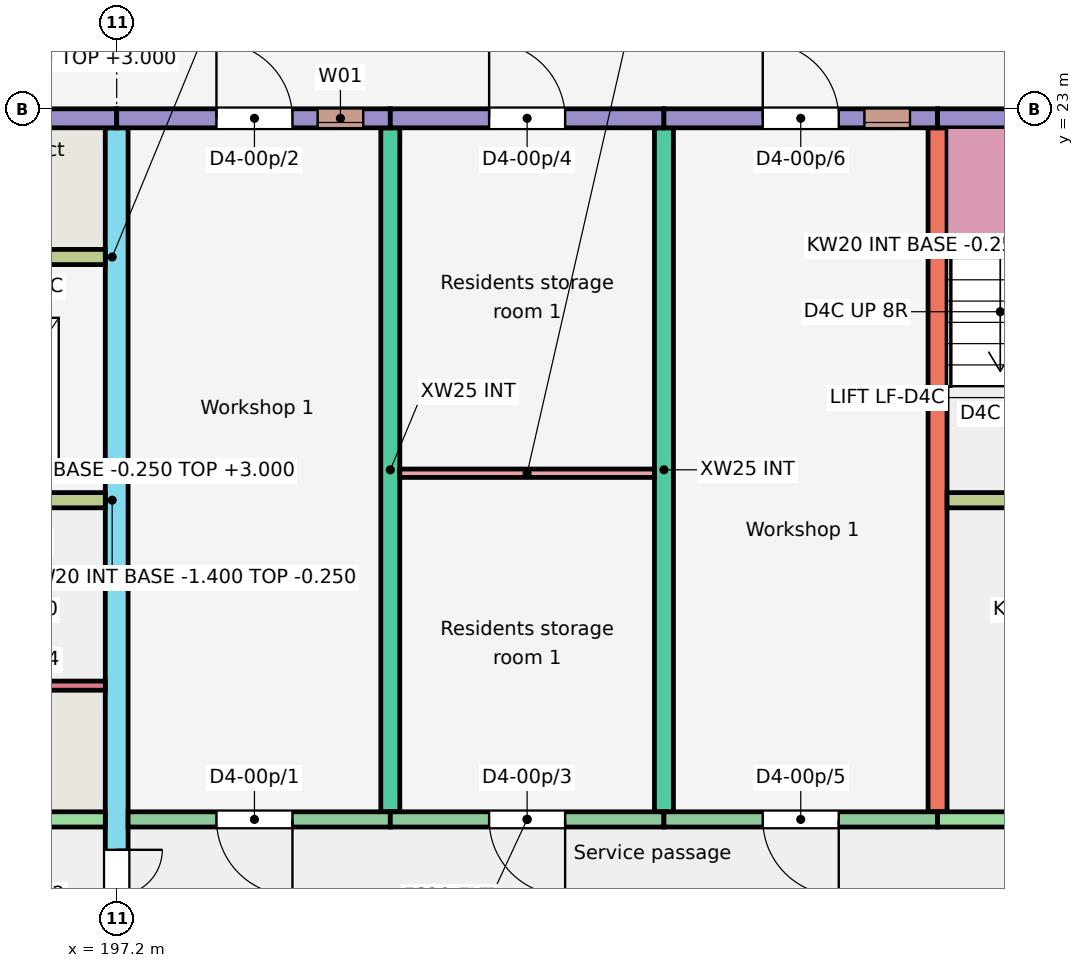
"""IFC4 building model, lengths in metres.
Left out: names, types, materials, properties, quantities, classifications, styles, units other than length and angle.
Written with IfcOpenShell. Run it as: python <this file> out.ifc"""

import sys

from ifc_helpers import new_model, si_unit, direction, frame, frame_2d, origin, place, context, subcontext, project, spatial, rectangle, extrude, element, fill, save


model = new_model("IFC4")
c1 = context("Model", 3, precision=1e-05, world=origin(), true_north=direction((0.0, 1.0)))
c2 = subcontext(c1, "Body", "Model", "MODEL_VIEW")
j1 = project(units=[si_unit("LENGTHUNIT", "METRE"), si_unit("PLANEANGLEUNIT", "RADIAN")], contexts=[c1])
p1 = place(None, origin())
s1 = spatial("IfcSite", under=j1, at=p1, CompositionType="ELEMENT")
p2 = place(p1, origin())
s2 = spatial("IfcBuilding", under=s1, at=p2, CompositionType="ELEMENT")
p3 = place(p2, origin())
s3 = spatial("IfcBuildingStorey", under=s2, at=p3, CompositionType="ELEMENT", Elevation=0.0)
p4 = place(p3, frame((197.2, 11.75, -0.25), z_axis=(0.0, 0.0, 1.0), x_axis=(0.0, 1.0, 0.0)))
e1 = element("IfcWall", 1, at=p4, inside=s3, PredefinedType="SHEAR", context=c2, shape_type="SweptSolid", body=[
    extrude(rectangle(XDim=11.0, YDim=0.3, at=frame_2d((5.5, 0.0))), origin(), (0.0, 0.0, 1.0), 3.25),
])
p5 = place(p4, frame((0.3, 0.0, 0.25)))
e2 = element("IfcOpeningElement", 2, at=p5, cuts=e1, PredefinedType="OPENING", context=c2, shape_type="SweptSolid", body=[
    extrude(rectangle(XDim=1.2, YDim=2.1, at=frame_2d((0.6, 1.05))), frame((0.0, 0.16, 0.0), z_axis=(0.0, -1.0, 0.0), x_axis=(1.0, 0.0, 0.0)), (0.0, 0.0, 1.0), 0.32),
])
for number, where, z_axis, x_axis in (
    (3, (200.8, 13.75, -0.25), (0.0, 0.0, 1.0), (0.0, 1.0, 0.0)),
    (4, (204.4, 13.75, -0.25), (0.0, 0.0, 1.0), (0.0, 1.0, 0.0)),
    (5, (208.0, 13.75, -0.25), (0.0, 0.0, 1.0), (0.0, 1.0, 0.0)),
):
    element("IfcWall", number, at=place(p3, frame(where, z_axis=z_axis, x_axis=x_axis)), inside=s3, PredefinedType="SHEAR", context=c2, shape_type="SweptSolid", body=[
        extrude(rectangle(XDim=9.0, YDim=0.25, at=frame_2d((4.5, 0.0))), origin(), (0.0, 0.0, 1.0), 3.25),
    ])
p6 = place(p3, frame((191.2, 22.875, -0.25), z_axis=(0.0, 0.0, 1.0), x_axis=(1.0, 0.0, 0.0)))
e6 = element("IfcWall", 6, at=p6, inside=s3, PredefinedType="SOLIDWALL", context=c2, shape_type="SweptSolid", body=[
    extrude(rectangle(XDim=6.0, YDim=0.25, at=frame_2d((3.0, 0.0))), origin(), (0.0, 0.0, 1.0), 3.25),
])
p7 = place(p6, frame((1.025, 0.0, 0.25)))
e7 = element("IfcOpeningElement", 7, at=p7, cuts=e6, PredefinedType="OPENING", context=c2, shape_type="SweptSolid", body=[
    extrude(rectangle(XDim=1.1, YDim=2.1, at=frame_2d((0.55, 1.05))), frame((0.0, 0.135, 0.0), z_axis=(0.0, -1.0, 0.0), x_axis=(1.0, 0.0, 0.0)), (0.0, 0.0, 1.0), 0.27),
])
p8 = place(p3, frame((191.2, 13.65, -0.25), z_axis=(0.0, 0.0, 1.0), x_axis=(1.0, 0.0, 0.0)))
e8 = element("IfcWall", 8, at=p8, inside=s3, PredefinedType="SHEAR", context=c2, shape_type="SweptSolid", body=[
    extrude(rectangle(XDim=5.85, YDim=0.2, at=frame_2d((2.925, 0.0))), origin(), (0.0, 0.0, 1.0), 3.25),
])
p9 = place(p8, frame((2.438, 0.0, 0.25)))
e9 = element("IfcOpeningElement", 9, at=p9, cuts=e8, PredefinedType="OPENING", context=c2, shape_type="SweptSolid", body=[
    extrude(rectangle(XDim=1.1, YDim=2.1, at=frame_2d((0.55, 1.05))), frame((0.0, 0.11, 0.0), z_axis=(0.0, -1.0, 0.0), x_axis=(1.0, 0.0, 0.0)), (0.0, 0.0, 1.0), 0.22),
])
p10 = place(p3, frame((191.325, 17.85, -0.25), z_axis=(0.0, 0.0, 1.0), x_axis=(1.0, 0.0, 0.0)))
e10 = element("IfcWall", 10, at=p10, inside=s3, PredefinedType="SHEAR", context=c2, shape_type="SweptSolid", body=[
    extrude(rectangle(XDim=5.725, YDim=0.2, at=frame_2d((2.863, 0.0))), origin(), (0.0, 0.0, 1.0), 3.25),
])
p11 = place(p10, frame((0.95, 0.0, 0.25)))
e11 = element("IfcOpeningElement", 11, at=p11, cuts=e10, PredefinedType="OPENING", context=c2, shape_type="SweptSolid", body=[
    extrude(rectangle(XDim=1.0, YDim=2.1, at=frame_2d((0.5, 1.05))), frame((0.0, 0.11, 0.0), z_axis=(0.0, -1.0, 0.0), x_axis=(1.0, 0.0, 0.0)), (0.0, 0.0, 1.0), 0.22),
])
p12 = place(p10, frame((3.863, 0.0, 0.25)))
e12 = element("IfcOpeningElement", 12, at=p12, cuts=e10, PredefinedType="OPENING", context=c2, shape_type="SweptSolid", body=[
    extrude(rectangle(XDim=1.1, YDim=2.1, at=frame_2d((0.55, 1.05))), frame((0.0, 0.11, 0.0), z_axis=(0.0, -1.0, 0.0), x_axis=(1.0, 0.0, 0.0)), (0.0, 0.0, 1.0), 0.22),
])
p13 = place(p3, frame((194.425, 21.05, -0.25), z_axis=(0.0, 0.0, 1.0), x_axis=(1.0, 0.0, 0.0)))
e13 = element("IfcWall", 13, at=p13, inside=s3, PredefinedType="SHEAR", context=c2, shape_type="SweptSolid", body=[
    extrude(rectangle(XDim=2.625, YDim=0.2, at=frame_2d((1.312, 0.0))), origin(), (0.0, 0.0, 1.0), 3.25),
])
p14 = place(p3, frame((195.92, 15.41, -0.25), z_axis=(0.0, 0.0, 1.0), x_axis=(1.0, 0.0, 0.0)))
e14 = element("IfcWall", 14, at=p14, inside=s3, PredefinedType="SHEAR", context=c2, shape_type="SweptSolid", body=[
    extrude(rectangle(XDim=1.13, YDim=0.12, at=frame_2d((0.565, 0.0))), origin(), (0.0, 0.0, 1.0), 3.25),
])
p15 = place(p3, frame((197.2, 22.875, -0.25), z_axis=(0.0, 0.0, 1.0), x_axis=(1.0, 0.0, 0.0)))
e15 = element("IfcWall", 15, at=p15, inside=s3, PredefinedType="SOLIDWALL", context=c2, shape_type="SweptSolid", body=[
    extrude(rectangle(XDim=3.6, YDim=0.25, at=frame_2d((1.8, 0.0))), origin(), (0.0, 0.0, 1.0), 3.25),
])
p16 = place(p15, frame((2.644, 0.0, 2.05)))
e16 = element("IfcOpeningElement", 16, at=p16, cuts=e15, PredefinedType="OPENING", context=c2, shape_type="SweptSolid", body=[
    extrude(rectangle(XDim=0.6, YDim=0.6, at=frame_2d((0.3, 0.3))), frame((0.0, 0.135, 0.0), z_axis=(0.0, -1.0, 0.0), x_axis=(1.0, 0.0, 0.0)), (0.0, 0.0, 1.0), 0.27),
])
p17 = place(p15, frame((1.312, 0.0, 0.25)))
e17 = element("IfcOpeningElement", 17, at=p17, cuts=e15, PredefinedType="OPENING", context=c2, shape_type="SweptSolid", body=[
    extrude(rectangle(XDim=1.0, YDim=2.1, at=frame_2d((0.5, 1.05))), frame((0.0, 0.135, 0.0), z_axis=(0.0, -1.0, 0.0), x_axis=(1.0, 0.0, 0.0)), (0.0, 0.0, 1.0), 0.27),
])
p18 = place(p3, frame((197.35, 13.65, -0.25), z_axis=(0.0, 0.0, 1.0), x_axis=(1.0, 0.0, 0.0)))
e18 = element("IfcWall", 18, at=p18, inside=s3, PredefinedType="SOLIDWALL", context=c2, shape_type="SweptSolid", body=[
    extrude(rectangle(XDim=3.45, YDim=0.2, at=frame_2d((1.725, 0.0))), origin(), (0.0, 0.0, 1.0), 3.25),
])
p19 = place(p18, frame((1.163, 0.0, 0.25)))
e19 = element("IfcOpeningElement", 19, at=p19, cuts=e18, PredefinedType="OPENING", context=c2, shape_type="SweptSolid", body=[
    extrude(rectangle(XDim=1.0, YDim=2.1, at=frame_2d((0.5, 1.05))), frame((0.0, 0.11, 0.0), z_axis=(0.0, -1.0, 0.0), x_axis=(1.0, 0.0, 0.0)), (0.0, 0.0, 1.0), 0.22),
])
p20 = place(p3, frame((200.8, 22.875, -0.25), z_axis=(0.0, 0.0, 1.0), x_axis=(1.0, 0.0, 0.0)))
e20 = element("IfcWall", 20, at=p20, inside=s3, PredefinedType="SOLIDWALL", context=c2, shape_type="SweptSolid", body=[
    extrude(rectangle(XDim=3.6, YDim=0.25, at=frame_2d((1.8, 0.0))), origin(), (0.0, 0.0, 1.0), 3.25),
])
p21 = place(p20, frame((1.3, 0.0, 0.25)))
e21 = element("IfcOpeningElement", 21, at=p21, cuts=e20, PredefinedType="OPENING", context=c2, shape_type="SweptSolid", body=[
    extrude(rectangle(XDim=1.0, YDim=2.1, at=frame_2d((0.5, 1.05))), frame((0.0, 0.135, 0.0), z_axis=(0.0, -1.0, 0.0), x_axis=(1.0, 0.0, 0.0)), (0.0, 0.0, 1.0), 0.27),
])
p22 = place(p3, frame((200.8, 13.65, -0.25), z_axis=(0.0, 0.0, 1.0), x_axis=(1.0, 0.0, 0.0)))
e22 = element("IfcWall", 22, at=p22, inside=s3, PredefinedType="SOLIDWALL", context=c2, shape_type="SweptSolid", body=[
    extrude(rectangle(XDim=3.6, YDim=0.2, at=frame_2d((1.8, 0.0))), origin(), (0.0, 0.0, 1.0), 3.25),
])
p23 = place(p22, frame((1.3, 0.0, 0.25)))
e23 = element("IfcOpeningElement", 23, at=p23, cuts=e22, PredefinedType="OPENING", context=c2, shape_type="SweptSolid", body=[
    extrude(rectangle(XDim=1.0, YDim=2.1, at=frame_2d((0.5, 1.05))), frame((0.0, 0.11, 0.0), z_axis=(0.0, -1.0, 0.0), x_axis=(1.0, 0.0, 0.0)), (0.0, 0.0, 1.0), 0.22),
])
p24 = place(p3, frame((204.4, 22.875, -0.25), z_axis=(0.0, 0.0, 1.0), x_axis=(1.0, 0.0, 0.0)))
e24 = element("IfcWall", 24, at=p24, inside=s3, PredefinedType="SOLIDWALL", context=c2, shape_type="SweptSolid", body=[
    extrude(rectangle(XDim=3.6, YDim=0.25, at=frame_2d((1.8, 0.0))), origin(), (0.0, 0.0, 1.0), 3.25),
])
p25 = place(p24, frame((2.637, 0.0, 2.05)))
e25 = element("IfcOpeningElement", 25, at=p25, cuts=e24, PredefinedType="OPENING", context=c2, shape_type="SweptSolid", body=[
    extrude(rectangle(XDim=0.6, YDim=0.6, at=frame_2d((0.3, 0.3))), frame((0.0, 0.135, 0.0), z_axis=(0.0, -1.0, 0.0), x_axis=(1.0, 0.0, 0.0)), (0.0, 0.0, 1.0), 0.27),
])
p26 = place(p24, frame((1.3, 0.0, 0.25)))
e26 = element("IfcOpeningElement", 26, at=p26, cuts=e24, PredefinedType="OPENING", context=c2, shape_type="SweptSolid", body=[
    extrude(rectangle(XDim=1.0, YDim=2.1, at=frame_2d((0.5, 1.05))), frame((0.0, 0.135, 0.0), z_axis=(0.0, -1.0, 0.0), x_axis=(1.0, 0.0, 0.0)), (0.0, 0.0, 1.0), 0.27),
])
p27 = place(p3, frame((204.4, 13.65, -0.25), z_axis=(0.0, 0.0, 1.0), x_axis=(1.0, 0.0, 0.0)))
e27 = element("IfcWall", 27, at=p27, inside=s3, PredefinedType="SOLIDWALL", context=c2, shape_type="SweptSolid", body=[
    extrude(rectangle(XDim=3.6, YDim=0.2, at=frame_2d((1.8, 0.0))), origin(), (0.0, 0.0, 1.0), 3.25),
])
p28 = place(p27, frame((1.3, 0.0, 0.25)))
e28 = element("IfcOpeningElement", 28, at=p28, cuts=e27, PredefinedType="OPENING", context=c2, shape_type="SweptSolid", body=[
    extrude(rectangle(XDim=1.0, YDim=2.1, at=frame_2d((0.5, 1.05))), frame((0.0, 0.11, 0.0), z_axis=(0.0, -1.0, 0.0), x_axis=(1.0, 0.0, 0.0)), (0.0, 0.0, 1.0), 0.22),
])
p29 = place(p3, frame((208.0, 22.875, -0.25), z_axis=(0.0, 0.0, 1.0), x_axis=(1.0, 0.0, 0.0)))
e29 = element("IfcWall", 29, at=p29, inside=s3, PredefinedType="SOLIDWALL", context=c2, shape_type="SweptSolid", body=[
    extrude(rectangle(XDim=6.0, YDim=0.25, at=frame_2d((3.0, 0.0))), origin(), (0.0, 0.0, 1.0), 3.25),
])
p30 = place(p29, frame((1.025, 0.0, 0.25)))
e30 = element("IfcOpeningElement", 30, at=p30, cuts=e29, PredefinedType="OPENING", context=c2, shape_type="SweptSolid", body=[
    extrude(rectangle(XDim=1.1, YDim=2.1, at=frame_2d((0.55, 1.05))), frame((0.0, 0.135, 0.0), z_axis=(0.0, -1.0, 0.0), x_axis=(1.0, 0.0, 0.0)), (0.0, 0.0, 1.0), 0.27),
])
p31 = place(p3, frame((208.0, 13.65, -0.25), z_axis=(0.0, 0.0, 1.0), x_axis=(1.0, 0.0, 0.0)))
e31 = element("IfcWall", 31, at=p31, inside=s3, PredefinedType="SHEAR", context=c2, shape_type="SweptSolid", body=[
    extrude(rectangle(XDim=5.85, YDim=0.2, at=frame_2d((2.925, 0.0))), origin(), (0.0, 0.0, 1.0), 3.25),
])
p32 = place(p31, frame((2.438, 0.0, 0.25)))
e32 = element("IfcOpeningElement", 32, at=p32, cuts=e31, PredefinedType="OPENING", context=c2, shape_type="SweptSolid", body=[
    extrude(rectangle(XDim=1.1, YDim=2.1, at=frame_2d((0.55, 1.05))), frame((0.0, 0.11, 0.0), z_axis=(0.0, -1.0, 0.0), x_axis=(1.0, 0.0, 0.0)), (0.0, 0.0, 1.0), 0.22),
])
p33 = place(p3, frame((208.125, 17.85, -0.25), z_axis=(0.0, 0.0, 1.0), x_axis=(1.0, 0.0, 0.0)))
e33 = element("IfcWall", 33, at=p33, inside=s3, PredefinedType="SHEAR", context=c2, shape_type="SweptSolid", body=[
    extrude(rectangle(XDim=5.725, YDim=0.2, at=frame_2d((2.863, 0.0))), origin(), (0.0, 0.0, 1.0), 3.25),
])
p34 = place(p33, frame((0.95, 0.0, 0.25)))
e34 = element("IfcOpeningElement", 34, at=p34, cuts=e33, PredefinedType="OPENING", context=c2, shape_type="SweptSolid", body=[
    extrude(rectangle(XDim=1.0, YDim=2.1, at=frame_2d((0.5, 1.05))), frame((0.0, 0.11, 0.0), z_axis=(0.0, -1.0, 0.0), x_axis=(1.0, 0.0, 0.0)), (0.0, 0.0, 1.0), 0.22),
])
p35 = place(p33, frame((3.863, 0.0, 0.25)))
e35 = element("IfcOpeningElement", 35, at=p35, cuts=e33, PredefinedType="OPENING", context=c2, shape_type="SweptSolid", body=[
    extrude(rectangle(XDim=1.1, YDim=2.1, at=frame_2d((0.55, 1.05))), frame((0.0, 0.11, 0.0), z_axis=(0.0, -1.0, 0.0), x_axis=(1.0, 0.0, 0.0)), (0.0, 0.0, 1.0), 0.22),
])
for number, where, z_axis, x_axis in (
    (36, (194.225, 17.85, -1.4), (0.0, 0.0, 1.0), (1.0, 0.0, 0.0)),
    (37, (194.225, 21.05, -1.4), (0.0, 0.0, 1.0), (1.0, 0.0, 0.0)),
):
    element("IfcWall", number, at=place(p3, frame(where, z_axis=z_axis, x_axis=x_axis)), inside=s3, PredefinedType="SHEAR", context=c2, shape_type="SweptSolid", body=[
        extrude(rectangle(XDim=2.975, YDim=0.2, at=frame_2d((1.487, 0.0))), origin(), (0.0, 0.0, 1.0), 1.15),
    ])
p36 = place(p3, frame((197.125, 17.95, -1.4), z_axis=(0.0, 0.0, 1.0), x_axis=(0.0, 1.0, 0.0)))
e38 = element("IfcWall", 38, at=p36, inside=s3, PredefinedType="SHEAR", context=c2, shape_type="SweptSolid", body=[
    extrude(rectangle(XDim=3.0, YDim=0.15, at=frame_2d((1.5, 0.0))), origin(), (0.0, 0.0, 1.0), 1.15),
])
p37 = place(p3, frame((200.925, 18.205, 0.0), z_axis=(0.0, 0.0, 1.0), x_axis=(1.0, 0.0, 0.0)))
e39 = element("IfcWall", 39, at=p37, inside=s3, PredefinedType="PARTITIONING", context=c2, shape_type="SweptSolid", body=[
    extrude(rectangle(XDim=3.35, YDim=0.11, at=frame_2d((1.675, 0.0))), origin(), (0.0, 0.0, 1.0), 2.8),
])
p38 = place(p16, origin())
e40 = element("IfcWindow", 40, at=p38, inside=s3, PartitioningType="SINGLE_PANEL", PredefinedType="WINDOW", context=c2, shape_type="SweptSolid", body=[
    extrude(rectangle(XDim=0.6, YDim=0.6, at=frame_2d((0.3, 0.3))), frame((0.0, -0.025, 0.0), z_axis=(0.0, -1.0, 0.0), x_axis=(1.0, 0.0, 0.0)), (0.0, 0.0, 1.0), 0.06),
])
fill(e16, e40)
p39 = place(p25, origin())
e41 = element("IfcWindow", 41, at=p39, inside=s3, PartitioningType="SINGLE_PANEL", PredefinedType="WINDOW", context=c2, shape_type="SweptSolid", body=[
    extrude(rectangle(XDim=0.6, YDim=0.6, at=frame_2d((0.3, 0.3))), frame((0.0, -0.025, 0.0), z_axis=(0.0, -1.0, 0.0), x_axis=(1.0, 0.0, 0.0)), (0.0, 0.0, 1.0), 0.06),
])
fill(e25, e41)
p40 = place(p19, origin())
e42 = element("IfcDoor", 42, at=p40, inside=s3, OperationType="SINGLE_SWING_RIGHT", PredefinedType="DOOR", context=c2, shape_type="SweptSolid", body=[
    extrude(rectangle(XDim=1.0, YDim=2.1, at=frame_2d((0.5, 1.05))), frame((0.0, 0.025, 0.0), z_axis=(0.0, -1.0, 0.0), x_axis=(1.0, 0.0, 0.0)), (0.0, 0.0, 1.0), 0.05),
])
fill(e19, e42)
p41 = place(p17, origin())
e43 = element("IfcDoor", 43, at=p41, inside=s3, OperationType="SINGLE_SWING_LEFT", PredefinedType="DOOR", context=c2, shape_type="SweptSolid", body=[
    extrude(rectangle(XDim=1.0, YDim=2.1, at=frame_2d((0.5, 1.05))), frame((0.0, 0.025, 0.0), z_axis=(0.0, -1.0, 0.0), x_axis=(1.0, 0.0, 0.0)), (0.0, 0.0, 1.0), 0.05),
])
fill(e17, e43)
p42 = place(p23, origin())
e44 = element("IfcDoor", 44, at=p42, inside=s3, OperationType="SINGLE_SWING_RIGHT", PredefinedType="DOOR", context=c2, shape_type="SweptSolid", body=[
    extrude(rectangle(XDim=1.0, YDim=2.1, at=frame_2d((0.5, 1.05))), frame((0.0, 0.025, 0.0), z_axis=(0.0, -1.0, 0.0), x_axis=(1.0, 0.0, 0.0)), (0.0, 0.0, 1.0), 0.05),
])
fill(e23, e44)
p43 = place(p21, origin())
e45 = element("IfcDoor", 45, at=p43, inside=s3, OperationType="SINGLE_SWING_LEFT", PredefinedType="DOOR", context=c2, shape_type="SweptSolid", body=[
    extrude(rectangle(XDim=1.0, YDim=2.1, at=frame_2d((0.5, 1.05))), frame((0.0, 0.025, 0.0), z_axis=(0.0, -1.0, 0.0), x_axis=(1.0, 0.0, 0.0)), (0.0, 0.0, 1.0), 0.05),
])
fill(e21, e45)
p44 = place(p28, origin())
e46 = element("IfcDoor", 46, at=p44, inside=s3, OperationType="SINGLE_SWING_RIGHT", PredefinedType="DOOR", context=c2, shape_type="SweptSolid", body=[
    extrude(rectangle(XDim=1.0, YDim=2.1, at=frame_2d((0.5, 1.05))), frame((0.0, 0.025, 0.0), z_axis=(0.0, -1.0, 0.0), x_axis=(1.0, 0.0, 0.0)), (0.0, 0.0, 1.0), 0.05),
])
fill(e28, e46)
p45 = place(p26, origin())
e47 = element("IfcDoor", 47, at=p45, inside=s3, OperationType="SINGLE_SWING_LEFT", PredefinedType="DOOR", context=c2, shape_type="SweptSolid", body=[
    extrude(rectangle(XDim=1.0, YDim=2.1, at=frame_2d((0.5, 1.05))), frame((0.0, 0.025, 0.0), z_axis=(0.0, -1.0, 0.0), x_axis=(1.0, 0.0, 0.0)), (0.0, 0.0, 1.0), 0.05),
])
fill(e26, e47)
p46 = place(p5, origin())
e48 = element("IfcDoor", 48, at=p46, inside=s3, OperationType="DOUBLE_DOOR_SINGLE_SWING", PredefinedType="DOOR", context=c2, shape_type="SweptSolid", body=[
    extrude(rectangle(XDim=1.2, YDim=2.1, at=frame_2d((0.6, 1.05))), frame((0.0, 0.025, 0.0), z_axis=(0.0, -1.0, 0.0), x_axis=(1.0, 0.0, 0.0)), (0.0, 0.0, 1.0), 0.05),
])
fill(e2, e48)
save(model, sys.argv[1])
